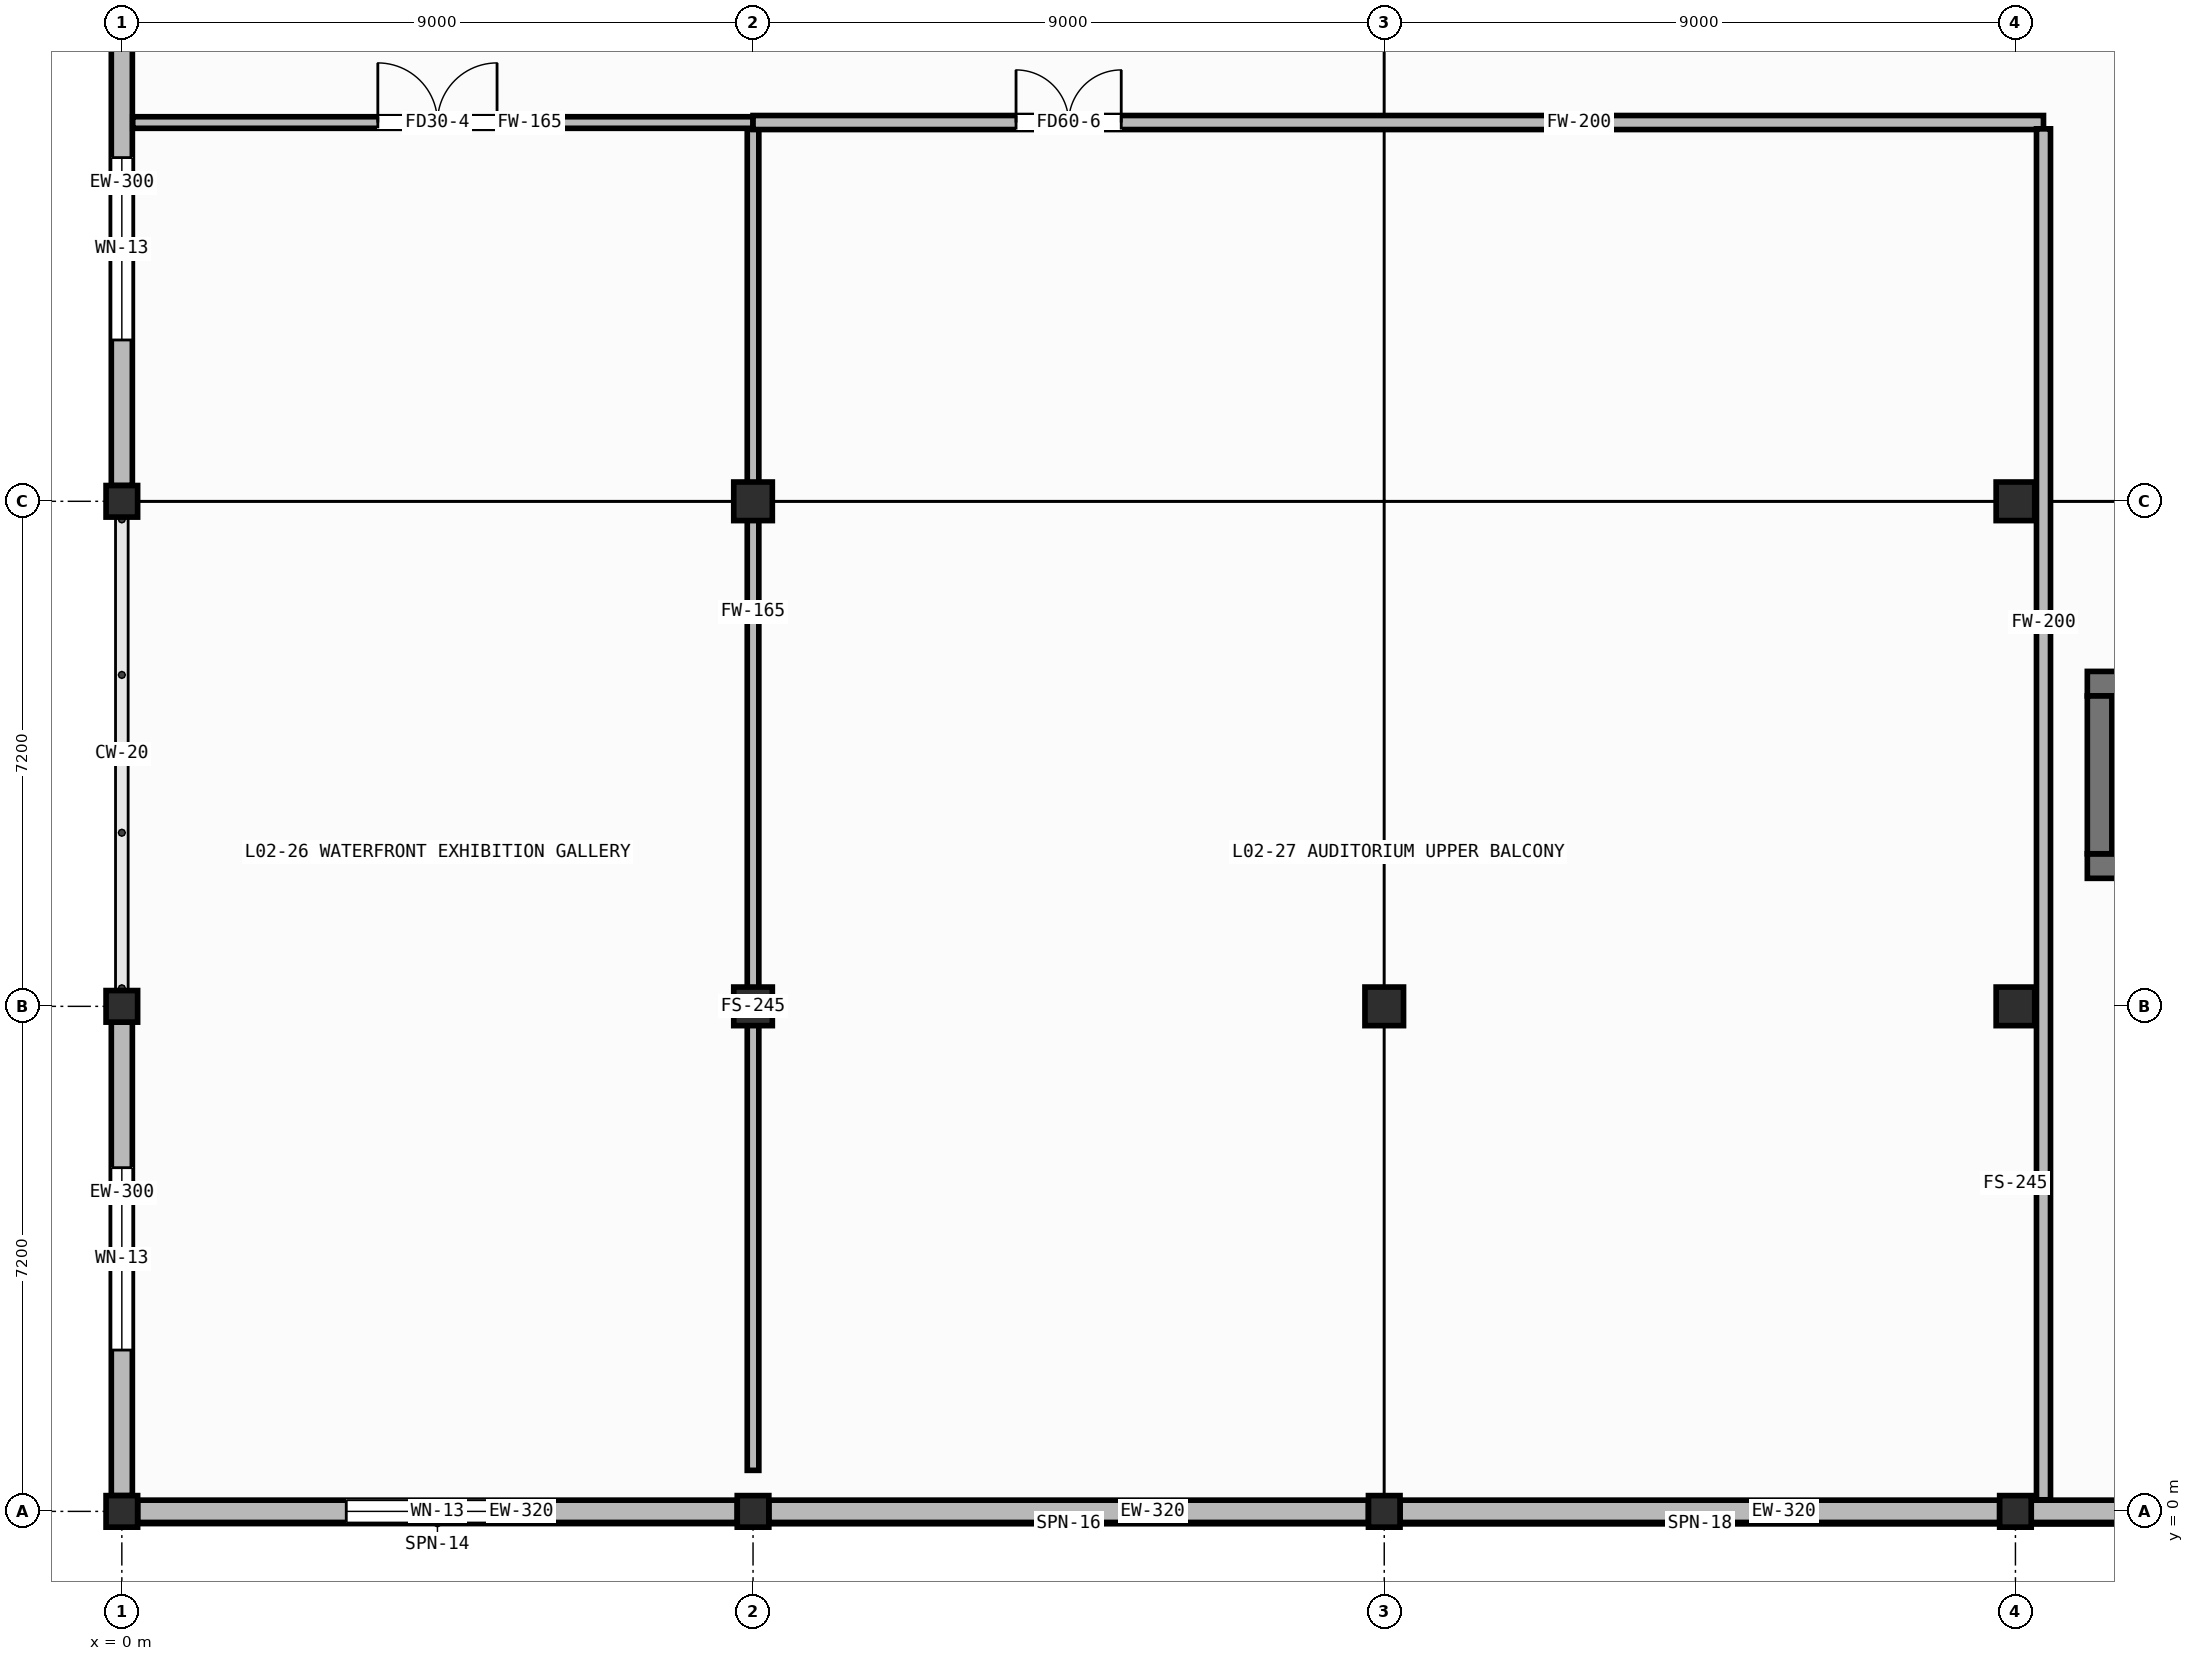
"""IFC4 building model, lengths in metres.
Left out: names, types, materials, properties, quantities, classifications, styles, units other than length and angle.
Written with IfcOpenShell. Run it as: python <this file> out.ifc"""

import sys

from ifc_helpers import new_model, si_unit, direction, frame, frame_2d, origin, origin_2d, place, context, subcontext, project, spatial, rectangle, hollow_rectangle, extrude, element, fill, save


model = new_model("IFC4")
c1 = context("Model", 3, precision=1e-05, world=origin(), true_north=direction((0.0, 1.0)))
c2 = subcontext(c1, "Body", "Model", "MODEL_VIEW")
j1 = project(units=[si_unit("LENGTHUNIT", "METRE"), si_unit("PLANEANGLEUNIT", "RADIAN")], contexts=[c1])
p1 = place(None, origin())
s1 = spatial("IfcSite", under=j1, at=p1, CompositionType="ELEMENT")
p2 = place(p1, origin())
s2 = spatial("IfcBuilding", under=s1, at=p2, CompositionType="ELEMENT")
p3 = place(p2, frame((0.0, 0.0, 4.8)))
s3 = spatial("IfcBuildingStorey", under=s2, at=p3, CompositionType="ELEMENT", Elevation=4.8)
for number, where, z_axis, x_axis in (
    (1, (0.0, 0.0, 0.0), (0.0, 0.0, 1.0), (1.0, 0.0, 0.0)),
    (2, (0.0, 7.2, 0.0), (0.0, 0.0, 1.0), (1.0, 0.0, 0.0)),
    (3, (0.0, 14.4, 0.0), (0.0, 0.0, 1.0), (1.0, 0.0, 0.0)),
    (4, (9.0, 0.0, 0.0), (0.0, 0.0, 1.0), (1.0, 0.0, 0.0)),
):
    element("IfcColumn", number, at=place(p3, frame(where, z_axis=z_axis, x_axis=x_axis)), inside=s3, PredefinedType="COLUMN", context=c2, shape_type="SweptSolid", body=[
        extrude(hollow_rectangle(XDim=0.45, YDim=0.45, WallThickness=0.019, at=origin_2d()), origin(), (0.0, 0.0, 1.0), 4.0),
    ])
for number, where, z_axis, x_axis in (
    (5, (9.0, 7.2, 0.0), (0.0, 0.0, 1.0), (1.0, 0.0, 0.0)),
    (6, (9.0, 14.4, 0.0), (0.0, 0.0, 1.0), (1.0, 0.0, 0.0)),
):
    element("IfcColumn", number, at=place(p3, frame(where, z_axis=z_axis, x_axis=x_axis)), inside=s3, PredefinedType="COLUMN", context=c2, shape_type="SweptSolid", body=[
        extrude(hollow_rectangle(XDim=0.55, YDim=0.55, WallThickness=0.022, at=origin_2d()), origin(), (0.0, 0.0, 1.0), 4.0),
    ])
p4 = place(p3, frame((18.0, 0.0, 0.0), z_axis=(0.0, 0.0, 1.0), x_axis=(1.0, 0.0, 0.0)))
e7 = element("IfcColumn", 7, at=p4, inside=s3, PredefinedType="COLUMN", context=c2, shape_type="SweptSolid", body=[
    extrude(hollow_rectangle(XDim=0.45, YDim=0.45, WallThickness=0.019, at=origin_2d()), origin(), (0.0, 0.0, 1.0), 4.0),
])
p5 = place(p3, frame((18.0, 7.2, 0.0), z_axis=(0.0, 0.0, 1.0), x_axis=(1.0, 0.0, 0.0)))
e8 = element("IfcColumn", 8, at=p5, inside=s3, PredefinedType="COLUMN", context=c2, shape_type="SweptSolid", body=[
    extrude(hollow_rectangle(XDim=0.55, YDim=0.55, WallThickness=0.022, at=origin_2d()), origin(), (0.0, 0.0, 1.0), 4.0),
])
p6 = place(p3, frame((27.0, 0.0, 0.0), z_axis=(0.0, 0.0, 1.0), x_axis=(1.0, 0.0, 0.0)))
e9 = element("IfcColumn", 9, at=p6, inside=s3, PredefinedType="COLUMN", context=c2, shape_type="SweptSolid", body=[
    extrude(hollow_rectangle(XDim=0.45, YDim=0.45, WallThickness=0.019, at=origin_2d()), origin(), (0.0, 0.0, 1.0), 4.0),
])
for number, where, z_axis, x_axis in (
    (10, (27.0, 7.2, 0.0), (0.0, 0.0, 1.0), (1.0, 0.0, 0.0)),
    (11, (27.0, 14.4, 0.0), (0.0, 0.0, 1.0), (1.0, 0.0, 0.0)),
):
    element("IfcColumn", number, at=place(p3, frame(where, z_axis=z_axis, x_axis=x_axis)), inside=s3, PredefinedType="COLUMN", context=c2, shape_type="SweptSolid", body=[
        extrude(hollow_rectangle(XDim=0.55, YDim=0.55, WallThickness=0.022, at=origin_2d()), origin(), (0.0, 0.0, 1.0), 4.0),
    ])
p7 = place(p3, frame((0.225, 0.0, 0.0), z_axis=(0.0, 0.0, 1.0), x_axis=(1.0, 0.0, 0.0)))
e12 = element("IfcWall", 12, at=p7, inside=s3, PredefinedType="STANDARD", context=c2, shape_type="SweptSolid", body=[
    extrude(rectangle(XDim=8.55, YDim=0.32, at=frame_2d((4.275, 0.0))), origin(), (0.0, 0.0, 1.0), 3.255),
])
p8 = place(p7, frame((2.975, 0.0, 0.85)))
e13 = element("IfcOpeningElement", 13, at=p8, cuts=e12, PredefinedType="OPENING", context=c2, shape_type="SweptSolid", body=[
    extrude(rectangle(XDim=2.6, YDim=1.6, at=frame_2d((1.3, 0.8))), frame((0.0, 0.172, 0.0), z_axis=(0.0, -1.0, 0.0), x_axis=(1.0, 0.0, 0.0)), (0.0, 0.0, 1.0), 0.344),
])
for number, where, z_axis, x_axis in (
    (14, (9.225, 0.0, 0.0), (0.0, 0.0, 1.0), (1.0, 0.0, 0.0)),
    (15, (18.225, 0.0, 0.0), (0.0, 0.0, 1.0), (1.0, 0.0, 0.0)),
    (16, (27.225, 0.0, 0.0), (0.0, 0.0, 1.0), (1.0, 0.0, 0.0)),
):
    element("IfcWall", number, at=place(p3, frame(where, z_axis=z_axis, x_axis=x_axis)), inside=s3, PredefinedType="STANDARD", context=c2, shape_type="SweptSolid", body=[
        extrude(rectangle(XDim=8.55, YDim=0.32, at=frame_2d((4.275, 0.0))), origin(), (0.0, 0.0, 1.0), 3.255),
    ])
p9 = place(p3, frame((0.0, 0.225, 0.0), z_axis=(0.0, 0.0, 1.0), x_axis=(0.0, 1.0, 0.0)))
e17 = element("IfcWall", 17, at=p9, inside=s3, PredefinedType="STANDARD", context=c2, shape_type="SweptSolid", body=[
    extrude(rectangle(XDim=6.75, YDim=0.3, at=frame_2d((3.375, 0.0))), origin(), (0.0, 0.0, 1.0), 3.255),
])
p10 = place(p9, frame((2.075, 0.0, 0.85)))
e18 = element("IfcOpeningElement", 18, at=p10, cuts=e17, PredefinedType="OPENING", context=c2, shape_type="SweptSolid", body=[
    extrude(rectangle(XDim=2.6, YDim=1.6, at=frame_2d((1.3, 0.8))), frame((0.0, 0.162, 0.0), z_axis=(0.0, -1.0, 0.0), x_axis=(1.0, 0.0, 0.0)), (0.0, 0.0, 1.0), 0.324),
])
p11 = place(p3, frame((0.0, 14.625, 0.0), z_axis=(0.0, 0.0, 1.0), x_axis=(0.0, 1.0, 0.0)))
e19 = element("IfcWall", 19, at=p11, inside=s3, PredefinedType="STANDARD", context=c2, shape_type="SweptSolid", body=[
    extrude(rectangle(XDim=6.75, YDim=0.3, at=frame_2d((3.375, 0.0))), origin(), (0.0, 0.0, 1.0), 3.255),
])
p12 = place(p11, frame((2.075, 0.0, 0.85)))
e20 = element("IfcOpeningElement", 20, at=p12, cuts=e19, PredefinedType="OPENING", context=c2, shape_type="SweptSolid", body=[
    extrude(rectangle(XDim=2.6, YDim=1.6, at=frame_2d((1.3, 0.8))), frame((0.0, 0.162, 0.0), z_axis=(0.0, -1.0, 0.0), x_axis=(1.0, 0.0, 0.0)), (0.0, 0.0, 1.0), 0.324),
])
p13 = place(p3, frame((28.025, 9.2, 0.0), z_axis=(0.0, 0.0, 1.0), x_axis=(1.0, 0.0, 0.0)))
e21 = element("IfcWall", 21, at=p13, inside=s3, PredefinedType="SHEAR", context=c2, shape_type="SweptSolid", body=[
    extrude(rectangle(XDim=2.75, YDim=0.35, at=frame_2d((1.375, 0.0))), origin(), (0.0, 0.0, 1.0), 3.755),
])
p14 = place(p3, frame((28.025, 11.8, 0.0), z_axis=(0.0, 0.0, 1.0), x_axis=(1.0, 0.0, 0.0)))
e22 = element("IfcWall", 22, at=p14, inside=s3, PredefinedType="SHEAR", context=c2, shape_type="SweptSolid", body=[
    extrude(rectangle(XDim=2.75, YDim=0.35, at=frame_2d((1.375, 0.0))), origin(), (0.0, 0.0, 1.0), 3.755),
])
p15 = place(p14, frame((0.825, 0.0, 0.0)))
e23 = element("IfcOpeningElement", 23, at=p15, cuts=e22, PredefinedType="OPENING", context=c2, shape_type="SweptSolid", body=[
    extrude(rectangle(XDim=1.1, YDim=2.1, at=frame_2d((0.55, 1.05))), frame((0.0, 0.187, 0.0), z_axis=(0.0, -1.0, 0.0), x_axis=(1.0, 0.0, 0.0)), (0.0, 0.0, 1.0), 0.374),
])
p16 = place(p3, frame((28.2, 9.375, 0.0), z_axis=(0.0, 0.0, 1.0), x_axis=(0.0, 1.0, 0.0)))
e24 = element("IfcWall", 24, at=p16, inside=s3, PredefinedType="SHEAR", context=c2, shape_type="SweptSolid", body=[
    extrude(rectangle(XDim=2.25, YDim=0.35, at=frame_2d((1.125, 0.0))), origin(), (0.0, 0.0, 1.0), 3.755),
])
p17 = place(p3, frame((0.155, 19.8, 0.0), z_axis=(0.0, 0.0, 1.0), x_axis=(1.0, 0.0, 0.0)))
e25 = element("IfcWall", 25, at=p17, inside=s3, PredefinedType="PARTITIONING", context=c2, shape_type="SweptSolid", body=[
    extrude(rectangle(XDim=8.845, YDim=0.165, at=frame_2d((4.422, 0.0))), origin(), (0.0, 0.0, 1.0), 3.755),
])
p18 = place(p17, frame((3.495, 0.0, 0.0)))
e26 = element("IfcOpeningElement", 26, at=p18, cuts=e25, PredefinedType="OPENING", context=c2, shape_type="SweptSolid", body=[
    extrude(rectangle(XDim=1.7, YDim=2.12, at=frame_2d((0.85, 1.06))), frame((0.0, 0.094, 0.0), z_axis=(0.0, -1.0, 0.0), x_axis=(1.0, 0.0, 0.0)), (0.0, 0.0, 1.0), 0.189),
])
p19 = place(p3, frame((9.0, 0.585, 0.0), z_axis=(0.0, 0.0, 1.0), x_axis=(0.0, 1.0, 0.0)))
e27 = element("IfcWall", 27, at=p19, inside=s3, PredefinedType="PARTITIONING", context=c2, shape_type="SweptSolid", body=[
    extrude(rectangle(XDim=19.125, YDim=0.165, at=frame_2d((9.562, 0.0))), origin(), (0.0, 0.0, 1.0), 3.035),
])
p20 = place(p3, frame((9.0, 19.8, 0.0), z_axis=(0.0, 0.0, 1.0), x_axis=(1.0, 0.0, 0.0)))
e28 = element("IfcWall", 28, at=p20, inside=s3, PredefinedType="PARTITIONING", context=c2, shape_type="SweptSolid", body=[
    extrude(rectangle(XDim=18.4, YDim=0.2, at=frame_2d((9.2, 0.0))), origin(), (0.0, 0.0, 1.0), 3.755),
])
p21 = place(p20, frame((3.75, 0.0, 0.0)))
e29 = element("IfcOpeningElement", 29, at=p21, cuts=e28, PredefinedType="OPENING", context=c2, shape_type="SweptSolid", body=[
    extrude(rectangle(XDim=1.5, YDim=2.1, at=frame_2d((0.75, 1.05))), frame((0.0, 0.112, 0.0), z_axis=(0.0, -1.0, 0.0), x_axis=(1.0, 0.0, 0.0)), (0.0, 0.0, 1.0), 0.224),
])
p22 = place(p3, frame((27.4, 0.165, 0.0), z_axis=(0.0, 0.0, 1.0), x_axis=(0.0, 1.0, 0.0)))
e30 = element("IfcWall", 30, at=p22, inside=s3, PredefinedType="PARTITIONING", context=c2, shape_type="SweptSolid", body=[
    extrude(rectangle(XDim=19.545, YDim=0.2, at=frame_2d((9.772, 0.0))), origin(), (0.0, 0.0, 1.0), 3.755),
])
p23 = place(p8, origin())
e31 = element("IfcWindow", 31, at=p23, inside=s3, PartitioningType="DOUBLE_PANEL_VERTICAL", PredefinedType="WINDOW", context=c2, shape_type="SweptSolid", body=[
    extrude(rectangle(XDim=2.6, YDim=1.6, at=frame_2d((1.3, 0.8))), frame((0.0, 0.03, 0.0), z_axis=(0.0, -1.0, 0.0), x_axis=(1.0, 0.0, 0.0)), (0.0, 0.0, 1.0), 0.06),
])
fill(e13, e31)
p24 = place(p10, origin())
e32 = element("IfcWindow", 32, at=p24, inside=s3, PartitioningType="DOUBLE_PANEL_VERTICAL", PredefinedType="WINDOW", context=c2, shape_type="SweptSolid", body=[
    extrude(rectangle(XDim=2.6, YDim=1.6, at=frame_2d((1.3, 0.8))), frame((0.0, 0.03, 0.0), z_axis=(0.0, -1.0, 0.0), x_axis=(1.0, 0.0, 0.0)), (0.0, 0.0, 1.0), 0.06),
])
fill(e18, e32)
p25 = place(p12, origin())
e33 = element("IfcWindow", 33, at=p25, inside=s3, PartitioningType="DOUBLE_PANEL_VERTICAL", PredefinedType="WINDOW", context=c2, shape_type="SweptSolid", body=[
    extrude(rectangle(XDim=2.6, YDim=1.6, at=frame_2d((1.3, 0.8))), frame((0.0, 0.03, 0.0), z_axis=(0.0, -1.0, 0.0), x_axis=(1.0, 0.0, 0.0)), (0.0, 0.0, 1.0), 0.06),
])
fill(e20, e33)
p26 = place(p18, origin())
e34 = element("IfcDoor", 34, at=p26, inside=s3, OperationType="DOUBLE_DOOR_SINGLE_SWING", PredefinedType="DOOR", context=c2, shape_type="SweptSolid", body=[
    extrude(rectangle(XDim=1.7, YDim=2.12, at=frame_2d((0.85, 1.06))), frame((0.0, 0.025, 0.0), z_axis=(0.0, -1.0, 0.0), x_axis=(1.0, 0.0, 0.0)), (0.0, 0.0, 1.0), 0.05),
])
fill(e26, e34)
p27 = place(p21, origin())
e35 = element("IfcDoor", 35, at=p27, inside=s3, OperationType="DOUBLE_DOOR_SINGLE_SWING", PredefinedType="DOOR", context=c2, shape_type="SweptSolid", body=[
    extrude(rectangle(XDim=1.5, YDim=2.1, at=frame_2d((0.75, 1.05))), frame((0.0, 0.025, 0.0), z_axis=(0.0, -1.0, 0.0), x_axis=(1.0, 0.0, 0.0)), (0.0, 0.0, 1.0), 0.05),
])
fill(e29, e35)
save(model, sys.argv[1])
